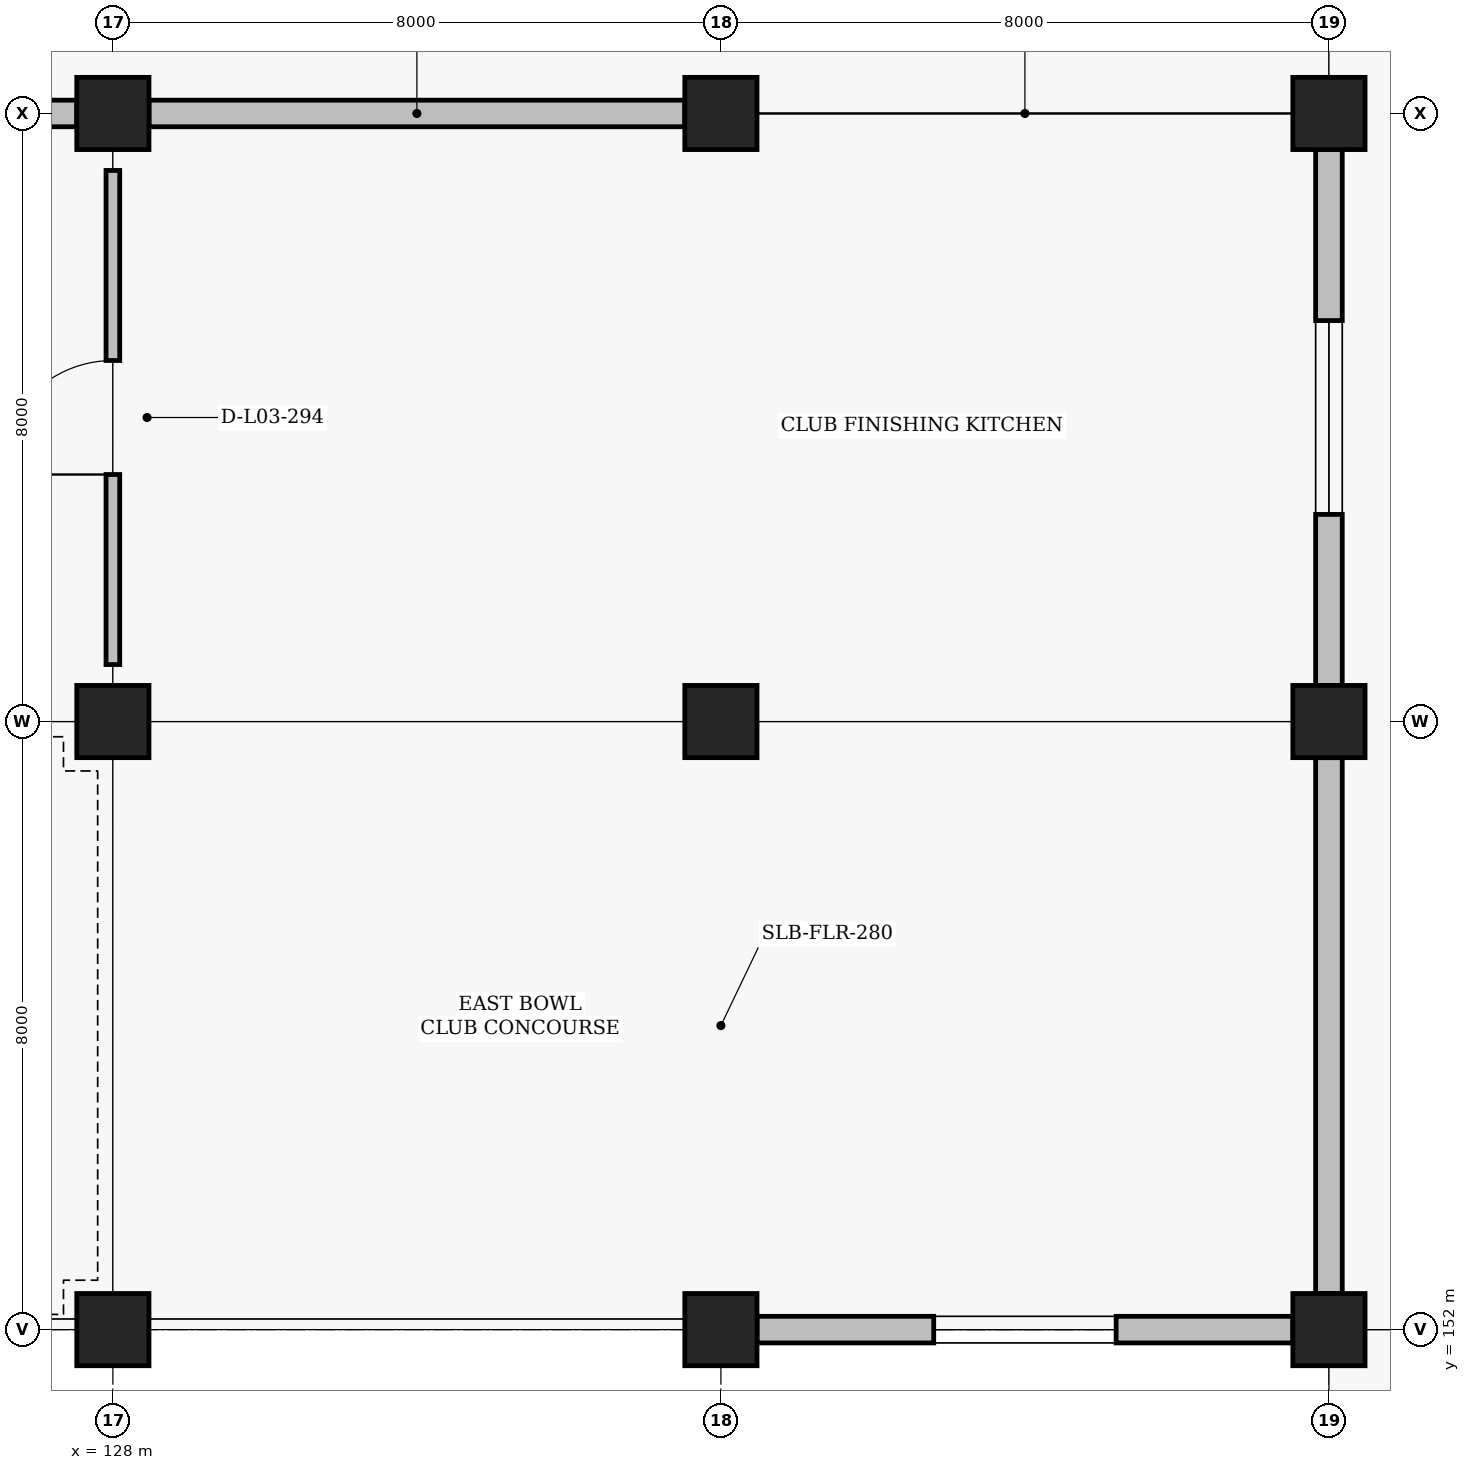
"""IFC4 building model, lengths in metres.
Left out: names, types, materials, properties, quantities, classifications, styles, units other than length and angle.
Written with IfcOpenShell. Run it as: python <this file> out.ifc"""

import sys

from ifc_helpers import new_model, si_unit, direction, frame, frame_2d, origin, origin_2d, place, context, subcontext, project, spatial, rectangle, extrude, element, fill, save


model = new_model("IFC4")
c1 = context("Model", 3, precision=1e-05, world=origin(), true_north=direction((0.0, 1.0)))
c2 = subcontext(c1, "Body", "Model", "MODEL_VIEW")
j1 = project(units=[si_unit("LENGTHUNIT", "METRE"), si_unit("PLANEANGLEUNIT", "RADIAN")], contexts=[c1])
p1 = place(None, origin())
s1 = spatial("IfcSite", under=j1, at=p1, CompositionType="ELEMENT")
p2 = place(p1, origin())
s2 = spatial("IfcBuilding", under=s1, at=p2, CompositionType="ELEMENT")
p3 = place(p2, frame((0.0, 0.0, 9.6)))
s3 = spatial("IfcBuildingStorey", under=s2, at=p3, CompositionType="ELEMENT", Elevation=9.6)
for number, where, z_axis, x_axis in (
    (1, (128.0, 152.0, 0.0), (0.0, 0.0, 1.0), (1.0, 0.0, 0.0)),
    (2, (128.0, 160.0, 0.0), (0.0, 0.0, 1.0), (1.0, 0.0, 0.0)),
    (3, (128.0, 168.0, 0.0), (0.0, 0.0, 1.0), (1.0, 0.0, 0.0)),
    (4, (136.0, 152.0, 0.0), (0.0, 0.0, 1.0), (1.0, 0.0, 0.0)),
    (5, (136.0, 160.0, 0.0), (0.0, 0.0, 1.0), (1.0, 0.0, 0.0)),
    (6, (136.0, 168.0, 0.0), (0.0, 0.0, 1.0), (1.0, 0.0, 0.0)),
    (7, (144.0, 152.0, 0.0), (0.0, 0.0, 1.0), (1.0, 0.0, 0.0)),
    (8, (144.0, 160.0, 0.0), (0.0, 0.0, 1.0), (1.0, 0.0, 0.0)),
    (9, (144.0, 168.0, 0.0), (0.0, 0.0, 1.0), (1.0, 0.0, 0.0)),
):
    element("IfcColumn", number, at=place(p3, frame(where, z_axis=z_axis, x_axis=x_axis)), inside=s3, PredefinedType="COLUMN", context=c2, shape_type="SweptSolid", body=[
        extrude(rectangle(XDim=0.95, YDim=0.95, at=origin_2d()), origin(), (0.0, 0.0, 1.0), 4.8),
    ])
p4 = place(p3, frame((120.475, 168.0, 0.0), z_axis=(0.0, 0.0, 1.0), x_axis=(1.0, 0.0, 0.0)))
e10 = element("IfcWall", 10, at=p4, inside=s3, PredefinedType="SOLIDWALL", context=c2, shape_type="SweptSolid", body=[
    extrude(rectangle(XDim=7.05, YDim=0.35, at=frame_2d((3.525, 0.0))), origin(), (0.0, 0.0, 1.0), 3.93),
])
p5 = place(p4, frame((2.475, 0.0, 0.95)))
e11 = element("IfcOpeningElement", 11, at=p5, cuts=e10, PredefinedType="OPENING", context=c2, shape_type="SweptSolid", body=[
    extrude(rectangle(XDim=2.1, YDim=1.9, at=frame_2d((1.05, 0.95))), frame((0.0, 0.185, 0.0), z_axis=(0.0, -1.0, 0.0), x_axis=(1.0, 0.0, 0.0)), (0.0, 0.0, 1.0), 0.37),
])
p6 = place(p3, frame((128.475, 168.0, 0.0), z_axis=(0.0, 0.0, 1.0), x_axis=(1.0, 0.0, 0.0)))
e12 = element("IfcWall", 12, at=p6, inside=s3, PredefinedType="SOLIDWALL", context=c2, shape_type="SweptSolid", body=[
    extrude(rectangle(XDim=7.05, YDim=0.35, at=frame_2d((3.525, 0.0))), origin(), (0.0, 0.0, 1.0), 3.93),
])
p7 = place(p3, frame((136.475, 152.0, 0.0), z_axis=(0.0, 0.0, 1.0), x_axis=(1.0, 0.0, 0.0)))
e13 = element("IfcWall", 13, at=p7, inside=s3, PredefinedType="SOLIDWALL", context=c2, shape_type="SweptSolid", body=[
    extrude(rectangle(XDim=7.05, YDim=0.35, at=frame_2d((3.525, 0.0))), origin(), (0.0, 0.0, 1.0), 3.93),
])
p8 = place(p7, frame((2.325, 0.0, 0.95)))
e14 = element("IfcOpeningElement", 14, at=p8, cuts=e13, PredefinedType="OPENING", context=c2, shape_type="SweptSolid", body=[
    extrude(rectangle(XDim=2.4, YDim=2.0, at=frame_2d((1.2, 1.0))), frame((0.0, 0.185, 0.0), z_axis=(0.0, -1.0, 0.0), x_axis=(1.0, 0.0, 0.0)), (0.0, 0.0, 1.0), 0.37),
])
p9 = place(p3, frame((144.0, 152.475, 0.0), z_axis=(0.0, 0.0, 1.0), x_axis=(0.0, 1.0, 0.0)))
e15 = element("IfcWall", 15, at=p9, inside=s3, PredefinedType="SOLIDWALL", context=c2, shape_type="SweptSolid", body=[
    extrude(rectangle(XDim=7.05, YDim=0.35, at=frame_2d((3.525, 0.0))), origin(), (0.0, 0.0, 1.0), 3.95),
])
p10 = place(p3, frame((144.0, 160.475, 0.0), z_axis=(0.0, 0.0, 1.0), x_axis=(0.0, 1.0, 0.0)))
e16 = element("IfcWall", 16, at=p10, inside=s3, PredefinedType="SOLIDWALL", context=c2, shape_type="SweptSolid", body=[
    extrude(rectangle(XDim=7.05, YDim=0.35, at=frame_2d((3.525, 0.0))), origin(), (0.0, 0.0, 1.0), 3.95),
])
p11 = place(p10, frame((2.25, 0.0, 0.95)))
e17 = element("IfcOpeningElement", 17, at=p11, cuts=e16, PredefinedType="OPENING", context=c2, shape_type="SweptSolid", body=[
    extrude(rectangle(XDim=2.55, YDim=2.0, at=frame_2d((1.275, 1.0))), frame((0.0, 0.185, 0.0), z_axis=(0.0, -1.0, 0.0), x_axis=(1.0, 0.0, 0.0)), (0.0, 0.0, 1.0), 0.37),
])
p12 = place(p3, frame((128.0, 160.75, 0.0), z_axis=(0.0, 0.0, 1.0), x_axis=(0.0, 1.0, 0.0)))
e18 = element("IfcWall", 18, at=p12, inside=s3, PredefinedType="PARTITIONING", context=c2, shape_type="SweptSolid", body=[
    extrude(rectangle(XDim=6.5, YDim=0.18, at=frame_2d((3.25, 0.0))), origin(), (0.0, 0.0, 1.0), 3.93),
])
p13 = place(p12, frame((2.5, 0.0, 0.0)))
e19 = element("IfcOpeningElement", 19, at=p13, cuts=e18, PredefinedType="OPENING", context=c2, shape_type="SweptSolid", body=[
    extrude(rectangle(XDim=1.5, YDim=2.2, at=frame_2d((0.75, 1.1))), frame((0.0, 0.1, 0.0), z_axis=(0.0, -1.0, 0.0), x_axis=(1.0, 0.0, 0.0)), (0.0, 0.0, 1.0), 0.2),
])
p14 = place(p8, origin())
e20 = element("IfcWindow", 20, at=p14, inside=s3, PartitioningType="SINGLE_PANEL", PredefinedType="WINDOW", context=c2, shape_type="SweptSolid", body=[
    extrude(rectangle(XDim=2.4, YDim=2.0, at=frame_2d((1.2, 1.0))), frame((0.0, 0.03, 0.0), z_axis=(0.0, -1.0, 0.0), x_axis=(1.0, 0.0, 0.0)), (0.0, 0.0, 1.0), 0.06),
])
fill(e14, e20)
p15 = place(p11, origin())
e21 = element("IfcWindow", 21, at=p15, inside=s3, PartitioningType="SINGLE_PANEL", PredefinedType="WINDOW", context=c2, shape_type="SweptSolid", body=[
    extrude(rectangle(XDim=2.55, YDim=2.0, at=frame_2d((1.275, 1.0))), frame((0.0, 0.03, 0.0), z_axis=(0.0, -1.0, 0.0), x_axis=(1.0, 0.0, 0.0)), (0.0, 0.0, 1.0), 0.06),
])
fill(e17, e21)
p16 = place(p13, origin())
e22 = element("IfcDoor", 22, at=p16, inside=s3, OperationType="SINGLE_SWING_LEFT", PredefinedType="DOOR", context=c2, shape_type="SweptSolid", body=[
    extrude(rectangle(XDim=1.5, YDim=2.2, at=frame_2d((0.75, 1.1))), frame((0.0, 0.025, 0.0), z_axis=(0.0, -1.0, 0.0), x_axis=(1.0, 0.0, 0.0)), (0.0, 0.0, 1.0), 0.05),
])
fill(e19, e22)
save(model, sys.argv[1])
